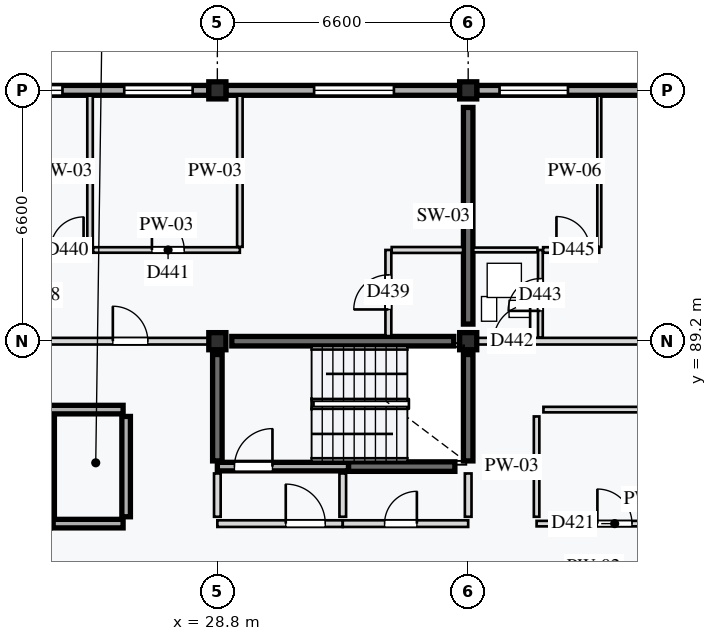
"""IFC4 building model, lengths in metres.
Left out: names, types, materials, properties, quantities, classifications, styles, units other than length and angle.
Written with IfcOpenShell. Run it as: python <this file> out.ifc"""

import sys

from ifc_helpers import new_model, si_unit, direction, frame, frame_2d, origin, origin_2d, place, context, subcontext, project, spatial, rectangle, extrude, element, fill, save


model = new_model("IFC4")
c1 = context("Model", 3, precision=1e-05, world=origin(), true_north=direction((0.0, 1.0)))
c2 = subcontext(c1, "Body", "Model", "MODEL_VIEW")
j1 = project(units=[si_unit("LENGTHUNIT", "METRE"), si_unit("PLANEANGLEUNIT", "RADIAN")], contexts=[c1])
p1 = place(None, origin())
s1 = spatial("IfcSite", under=j1, at=p1, CompositionType="ELEMENT")
p2 = place(p1, origin())
s2 = spatial("IfcBuilding", under=s1, at=p2, CompositionType="ELEMENT")
p3 = place(p2, frame((0.0, 0.0, 43.6)))
s3 = spatial("IfcBuildingStorey", under=s2, at=p3, CompositionType="ELEMENT", Elevation=43.6)
for number, where, z_axis, x_axis in (
    (1, (28.8, 89.2, 0.0), (0.0, 0.0, 1.0), (1.0, 0.0, 0.0)),
    (2, (28.8, 95.8, 0.0), (0.0, 0.0, 1.0), (1.0, 0.0, 0.0)),
    (3, (35.4, 89.2, 0.0), (0.0, 0.0, 1.0), (1.0, 0.0, 0.0)),
    (4, (35.4, 95.8, 0.0), (0.0, 0.0, 1.0), (1.0, 0.0, 0.0)),
):
    element("IfcColumn", number, at=place(p3, frame(where, z_axis=z_axis, x_axis=x_axis)), inside=s3, PredefinedType="COLUMN", context=c2, shape_type="SweptSolid", body=[
        extrude(rectangle(XDim=0.45, YDim=0.45, at=origin_2d()), origin(), (0.0, 0.0, 1.0), 3.2),
    ])
p4 = place(p3, frame((29.18, 89.2, 0.0), z_axis=(0.0, 0.0, 1.0), x_axis=(1.0, 0.0, 0.0)))
e5 = element("IfcWall", 5, at=p4, inside=s3, PredefinedType="SHEAR", context=c2, shape_type="SweptSolid", body=[
    extrude(rectangle(XDim=5.84, YDim=0.25, at=frame_2d((2.92, 0.0))), origin(), (0.0, 0.0, 1.0), 2.98),
])
for number, where, z_axis, x_axis in (
    (6, (32.25, 85.9, 0.0), (0.0, 0.0, 1.0), (1.0, 0.0, 0.0)),
    (7, (28.8, 86.05, 0.0), (0.0, 0.0, 1.0), (0.0, 1.0, 0.0)),
    (8, (35.4, 86.05, 0.0), (0.0, 0.0, 1.0), (0.0, 1.0, 0.0)),
):
    element("IfcWall", number, at=place(p3, frame(where, z_axis=z_axis, x_axis=x_axis)), inside=s3, PredefinedType="SHEAR", context=c2, shape_type="SweptSolid", body=[
        extrude(rectangle(XDim=2.8, YDim=0.25, at=frame_2d((1.4, 0.0))), origin(), (0.0, 0.0, 1.0), 2.98),
    ])
p5 = place(p3, frame((35.4, 89.65, 0.0), z_axis=(0.0, 0.0, 1.0), x_axis=(0.0, 1.0, 0.0)))
e9 = element("IfcWall", 9, at=p5, inside=s3, PredefinedType="SHEAR", context=c2, shape_type="SweptSolid", body=[
    extrude(rectangle(XDim=5.7, YDim=0.25, at=frame_2d((2.85, 0.0))), origin(), (0.0, 0.0, 1.0), 2.98),
])
p6 = place(p3, frame((22.425, 95.8, 0.0), z_axis=(0.0, 0.0, 1.0), x_axis=(1.0, 0.0, 0.0)))
e10 = element("IfcWall", 10, at=p6, inside=s3, PredefinedType="STANDARD", context=c2, shape_type="SweptSolid", body=[
    extrude(rectangle(XDim=6.15, YDim=0.26, at=frame_2d((3.075, 0.0))), origin(), (0.0, 0.0, 1.0), 2.6),
])
p7 = place(p6, frame((0.5, 0.0, 0.85)))
e11 = element("IfcOpeningElement", 11, at=p7, cuts=e10, PredefinedType="OPENING", context=c2, shape_type="SweptSolid", body=[
    extrude(rectangle(XDim=1.8, YDim=1.35, at=frame_2d((0.9, 0.675))), frame((0.0, 0.14, 0.0), z_axis=(0.0, -1.0, 0.0), x_axis=(1.0, 0.0, 0.0)), (0.0, 0.0, 1.0), 0.28),
])
p8 = place(p6, frame((3.925, 0.0, 0.85)))
e12 = element("IfcOpeningElement", 12, at=p8, cuts=e10, PredefinedType="OPENING", context=c2, shape_type="SweptSolid", body=[
    extrude(rectangle(XDim=1.8, YDim=1.35, at=frame_2d((0.9, 0.675))), frame((0.0, 0.14, 0.0), z_axis=(0.0, -1.0, 0.0), x_axis=(1.0, 0.0, 0.0)), (0.0, 0.0, 1.0), 0.28),
])
p9 = place(p3, frame((29.025, 95.8, 0.0), z_axis=(0.0, 0.0, 1.0), x_axis=(1.0, 0.0, 0.0)))
e13 = element("IfcWall", 13, at=p9, inside=s3, PredefinedType="STANDARD", context=c2, shape_type="SweptSolid", body=[
    extrude(rectangle(XDim=6.15, YDim=0.26, at=frame_2d((3.075, 0.0))), origin(), (0.0, 0.0, 1.0), 2.6),
])
p10 = place(p9, frame((2.321, 0.0, 0.85)))
e14 = element("IfcOpeningElement", 14, at=p10, cuts=e13, PredefinedType="OPENING", context=c2, shape_type="SweptSolid", body=[
    extrude(rectangle(XDim=2.1, YDim=1.55, at=frame_2d((1.05, 0.775))), frame((0.0, 0.14, 0.0), z_axis=(0.0, -1.0, 0.0), x_axis=(1.0, 0.0, 0.0)), (0.0, 0.0, 1.0), 0.28),
])
p11 = place(p3, frame((35.625, 95.8, 0.0), z_axis=(0.0, 0.0, 1.0), x_axis=(1.0, 0.0, 0.0)))
e15 = element("IfcWall", 15, at=p11, inside=s3, PredefinedType="STANDARD", context=c2, shape_type="SweptSolid", body=[
    extrude(rectangle(XDim=6.15, YDim=0.26, at=frame_2d((3.075, 0.0))), origin(), (0.0, 0.0, 1.0), 2.6),
])
p12 = place(p11, frame((0.6, 0.0, 0.85)))
e16 = element("IfcOpeningElement", 16, at=p12, cuts=e15, PredefinedType="OPENING", context=c2, shape_type="SweptSolid", body=[
    extrude(rectangle(XDim=1.8, YDim=1.35, at=frame_2d((0.9, 0.675))), frame((0.0, 0.14, 0.0), z_axis=(0.0, -1.0, 0.0), x_axis=(1.0, 0.0, 0.0)), (0.0, 0.0, 1.0), 0.28),
])
p13 = place(p3, frame((24.48, 84.4, 0.0), z_axis=(0.0, 0.0, 1.0), x_axis=(1.0, 0.0, 0.0)))
e17 = element("IfcWall", 17, at=p13, inside=s3, PredefinedType="STANDARD", context=c2, shape_type="SweptSolid", body=[
    extrude(rectangle(XDim=1.84, YDim=0.225, at=frame_2d((0.92, 0.0))), origin(), (0.0, 0.0, 1.0), 2.98),
])
p14 = place(p3, frame((22.298, 87.4, 0.0), z_axis=(0.0, 0.0, 1.0), x_axis=(1.0, 0.0, 0.0)))
e18 = element("IfcWall", 18, at=p14, inside=s3, PredefinedType="STANDARD", context=c2, shape_type="SweptSolid", body=[
    extrude(rectangle(XDim=4.022, YDim=0.225, at=frame_2d((2.011, 0.0))), origin(), (0.0, 0.0, 1.0), 2.98),
])
for number, where, z_axis, x_axis in (
    (19, (24.4, 84.58, 0.0), (0.0, 0.0, 1.0), (0.0, 1.0, 0.0)),
    (20, (26.4, 84.58, 0.0), (0.0, 0.0, 1.0), (0.0, 1.0, 0.0)),
):
    element("IfcWall", number, at=place(p3, frame(where, z_axis=z_axis, x_axis=x_axis)), inside=s3, PredefinedType="STANDARD", context=c2, shape_type="SweptSolid", body=[
        extrude(rectangle(XDim=2.64, YDim=0.225, at=frame_2d((1.32, 0.0))), origin(), (0.0, 0.0, 1.0), 2.98),
    ])
p15 = place(p3, frame((28.8, 85.9, 0.0), z_axis=(0.0, 0.0, 1.0), x_axis=(1.0, 0.0, 0.0)))
e21 = element("IfcWall", 21, at=p15, inside=s3, PredefinedType="STANDARD", context=c2, shape_type="SweptSolid", body=[
    extrude(rectangle(XDim=3.45, YDim=0.225, at=frame_2d((1.725, 0.0))), origin(), (0.0, 0.0, 1.0), 2.98),
])
p16 = place(p15, frame((0.45, 0.0, 0.0)))
e22 = element("IfcOpeningElement", 22, at=p16, cuts=e21, PredefinedType="OPENING", context=c2, shape_type="SweptSolid", body=[
    extrude(rectangle(XDim=1.0, YDim=2.16, at=frame_2d((0.5, 1.08))), frame((0.0, 0.123, 0.0), z_axis=(0.0, -1.0, 0.0), x_axis=(1.0, 0.0, 0.0)), (0.0, 0.0, 1.0), 0.245),
])
p17 = place(p3, frame((28.8, 84.4, 0.0), z_axis=(0.0, 0.0, 1.0), x_axis=(1.0, 0.0, 0.0)))
e23 = element("IfcWall", 23, at=p17, inside=s3, PredefinedType="PARTITIONING", context=c2, shape_type="SweptSolid", body=[
    extrude(rectangle(XDim=3.3, YDim=0.175, at=frame_2d((1.65, 0.0))), origin(), (0.0, 0.0, 1.0), 2.98),
])
p18 = place(p17, frame((1.8, 0.0, 0.0)))
e24 = element("IfcOpeningElement", 24, at=p18, cuts=e23, PredefinedType="OPENING", context=c2, shape_type="SweptSolid", body=[
    extrude(rectangle(XDim=1.04, YDim=2.12, at=frame_2d((0.52, 1.06))), frame((0.0, 0.097, 0.0), z_axis=(0.0, -1.0, 0.0), x_axis=(1.0, 0.0, 0.0)), (0.0, 0.0, 1.0), 0.195),
])
p19 = place(p3, frame((32.1, 84.4, 0.0), z_axis=(0.0, 0.0, 1.0), x_axis=(1.0, 0.0, 0.0)))
e25 = element("IfcWall", 25, at=p19, inside=s3, PredefinedType="PARTITIONING", context=c2, shape_type="SweptSolid", body=[
    extrude(rectangle(XDim=3.3, YDim=0.175, at=frame_2d((1.65, 0.0))), origin(), (0.0, 0.0, 1.0), 2.98),
])
p20 = place(p19, frame((1.1, 0.0, 0.0)))
e26 = element("IfcOpeningElement", 26, at=p20, cuts=e25, PredefinedType="OPENING", context=c2, shape_type="SweptSolid", body=[
    extrude(rectangle(XDim=0.85, YDim=2.0, at=frame_2d((0.425, 1.0))), frame((0.0, 0.097, 0.0), z_axis=(0.0, -1.0, 0.0), x_axis=(1.0, 0.0, 0.0)), (0.0, 0.0, 1.0), 0.195),
])
for number, where, z_axis, x_axis in (
    (27, (28.8, 84.58, 0.0), (0.0, 0.0, 1.0), (0.0, 1.0, 0.0)),
    (28, (32.1, 84.58, 0.0), (0.0, 0.0, 1.0), (0.0, 1.0, 0.0)),
    (29, (35.4, 84.58, 0.0), (0.0, 0.0, 1.0), (0.0, 1.0, 0.0)),
):
    element("IfcWall", number, at=place(p3, frame(where, z_axis=z_axis, x_axis=x_axis)), inside=s3, PredefinedType="PARTITIONING", context=c2, shape_type="SweptSolid", body=[
        extrude(rectangle(XDim=1.14, YDim=0.175, at=frame_2d((0.57, 0.0))), origin(), (0.0, 0.0, 1.0), 2.98),
    ])
p21 = place(p3, frame((37.2, 84.4, 0.0), z_axis=(0.0, 0.0, 1.0), x_axis=(1.0, 0.0, 0.0)))
e30 = element("IfcWall", 30, at=p21, inside=s3, PredefinedType="PARTITIONING", context=c2, shape_type="SweptSolid", body=[
    extrude(rectangle(XDim=6.0, YDim=0.145, at=frame_2d((3.0, 0.0))), origin(), (0.0, 0.0, 1.0), 2.98),
])
p22 = place(p21, frame((1.6, 0.0, 0.0)))
e31 = element("IfcOpeningElement", 31, at=p22, cuts=e30, PredefinedType="OPENING", context=c2, shape_type="SweptSolid", body=[
    extrude(rectangle(XDim=0.91, YDim=2.14, at=frame_2d((0.455, 1.07))), frame((0.0, 0.083, 0.0), z_axis=(0.0, -1.0, 0.0), x_axis=(1.0, 0.0, 0.0)), (0.0, 0.0, 1.0), 0.165),
])
p23 = place(p3, frame((37.38, 87.4, 0.0), z_axis=(0.0, 0.0, 1.0), x_axis=(1.0, 0.0, 0.0)))
e32 = element("IfcWall", 32, at=p23, inside=s3, PredefinedType="PARTITIONING", context=c2, shape_type="SweptSolid", body=[
    extrude(rectangle(XDim=11.2, YDim=0.145, at=frame_2d((5.6, 0.0))), origin(), (0.0, 0.0, 1.0), 2.98),
])
p24 = place(p3, frame((37.2, 84.58, 0.0), z_axis=(0.0, 0.0, 1.0), x_axis=(0.0, 1.0, 0.0)))
e33 = element("IfcWall", 33, at=p24, inside=s3, PredefinedType="PARTITIONING", context=c2, shape_type="SweptSolid", body=[
    extrude(rectangle(XDim=2.64, YDim=0.145, at=frame_2d((1.32, 0.0))), origin(), (0.0, 0.0, 1.0), 2.98),
])
p25 = place(p3, frame((22.2, 89.2, 0.0), z_axis=(0.0, 0.0, 1.0), x_axis=(1.0, 0.0, 0.0)))
e34 = element("IfcWall", 34, at=p25, inside=s3, PredefinedType="PARTITIONING", context=c2, shape_type="SweptSolid", body=[
    extrude(rectangle(XDim=6.6, YDim=0.175, at=frame_2d((3.3, 0.0))), origin(), (0.0, 0.0, 1.0), 2.7),
])
p26 = place(p25, frame((3.85, 0.0, 0.0)))
e35 = element("IfcOpeningElement", 35, at=p26, cuts=e34, PredefinedType="OPENING", context=c2, shape_type="SweptSolid", body=[
    extrude(rectangle(XDim=0.92, YDim=2.14, at=frame_2d((0.46, 1.07))), frame((0.0, 0.097, 0.0), z_axis=(0.0, -1.0, 0.0), x_axis=(1.0, 0.0, 0.0)), (0.0, 0.0, 1.0), 0.195),
])
p27 = place(p3, frame((33.3, 89.335, 0.0), z_axis=(0.0, 0.0, 1.0), x_axis=(0.0, 1.0, 0.0)))
e36 = element("IfcWall", 36, at=p27, inside=s3, PredefinedType="PARTITIONING", context=c2, shape_type="SweptSolid", body=[
    extrude(rectangle(XDim=2.265, YDim=0.155, at=frame_2d((1.133, 0.0))), origin(), (0.0, 0.0, 1.0), 2.98),
])
p28 = place(p27, frame((0.7, 0.0, 0.0)))
e37 = element("IfcOpeningElement", 37, at=p28, cuts=e36, PredefinedType="OPENING", context=c2, shape_type="SweptSolid", body=[
    extrude(rectangle(XDim=0.91, YDim=2.14, at=frame_2d((0.455, 1.07))), frame((0.0, 0.087, 0.0), z_axis=(0.0, -1.0, 0.0), x_axis=(1.0, 0.0, 0.0)), (0.0, 0.0, 1.0), 0.175),
])
p29 = place(p3, frame((33.387, 91.6, 0.0), z_axis=(0.0, 0.0, 1.0), x_axis=(1.0, 0.0, 0.0)))
e38 = element("IfcWall", 38, at=p29, inside=s3, PredefinedType="PARTITIONING", context=c2, shape_type="SweptSolid", body=[
    extrude(rectangle(XDim=1.877, YDim=0.155, at=frame_2d((0.939, 0.0))), origin(), (0.0, 0.0, 1.0), 2.98),
])
p30 = place(p3, frame((24.173, 91.6, 0.0), z_axis=(0.0, 0.0, 1.0), x_axis=(1.0, 0.0, 0.0)))
e39 = element("IfcWall", 39, at=p30, inside=s3, PredefinedType="PARTITIONING", context=c2, shape_type="SweptSolid", body=[
    extrude(rectangle(XDim=1.277, YDim=0.105, at=frame_2d((0.639, 0.0))), origin(), (0.0, 0.0, 1.0), 2.98),
])
p31 = place(p30, frame((0.238, 0.0, 0.0)))
e40 = element("IfcOpeningElement", 40, at=p31, cuts=e39, PredefinedType="OPENING", context=c2, shape_type="SweptSolid", body=[
    extrude(rectangle(XDim=0.87, YDim=2.08, at=frame_2d((0.435, 1.04))), frame((0.0, 0.062, 0.0), z_axis=(0.0, -1.0, 0.0), x_axis=(1.0, 0.0, 0.0)), (0.0, 0.0, 1.0), 0.125),
])
p32 = place(p3, frame((25.45, 91.68, 0.0), z_axis=(0.0, 0.0, 1.0), x_axis=(0.0, 1.0, 0.0)))
e41 = element("IfcWall", 41, at=p32, inside=s3, PredefinedType="PARTITIONING", context=c2, shape_type="SweptSolid", body=[
    extrude(rectangle(XDim=3.98, YDim=0.145, at=frame_2d((1.99, 0.0))), origin(), (0.0, 0.0, 1.0), 2.98),
])
p33 = place(p3, frame((25.532, 91.6, 0.0), z_axis=(0.0, 0.0, 1.0), x_axis=(1.0, 0.0, 0.0)))
e42 = element("IfcWall", 42, at=p33, inside=s3, PredefinedType="PARTITIONING", context=c2, shape_type="SweptSolid", body=[
    extrude(rectangle(XDim=3.86, YDim=0.145, at=frame_2d((1.93, 0.0))), origin(), (0.0, 0.0, 1.0), 2.98),
])
p34 = place(p33, frame((1.546, 0.0, 0.0)))
e43 = element("IfcOpeningElement", 43, at=p34, cuts=e42, PredefinedType="OPENING", context=c2, shape_type="SweptSolid", body=[
    extrude(rectangle(XDim=0.85, YDim=2.1, at=frame_2d((0.425, 1.05))), frame((0.0, 0.083, 0.0), z_axis=(0.0, -1.0, 0.0), x_axis=(1.0, 0.0, 0.0)), (0.0, 0.0, 1.0), 0.165),
])
p35 = place(p3, frame((29.392, 91.683, 0.0), z_axis=(0.0, 0.0, 1.0), x_axis=(0.0, 1.0, 0.0)))
e44 = element("IfcWall", 44, at=p35, inside=s3, PredefinedType="PARTITIONING", context=c2, shape_type="SweptSolid", body=[
    extrude(rectangle(XDim=3.977, YDim=0.145, at=frame_2d((1.989, 0.0))), origin(), (0.0, 0.0, 1.0), 2.98),
])
p36 = place(p3, frame((35.4, 89.2, 0.0), z_axis=(0.0, 0.0, 1.0), x_axis=(1.0, 0.0, 0.0)))
e45 = element("IfcWall", 45, at=p36, inside=s3, PredefinedType="PARTITIONING", context=c2, shape_type="SweptSolid", body=[
    extrude(rectangle(XDim=13.2, YDim=0.175, at=frame_2d((6.6, 0.0))), origin(), (0.0, 0.0, 1.0), 2.7),
])
p37 = place(p36, frame((0.67, 0.0, 0.0)))
e46 = element("IfcOpeningElement", 46, at=p37, cuts=e45, PredefinedType="OPENING", context=c2, shape_type="SweptSolid", body=[
    extrude(rectangle(XDim=0.96, YDim=2.18, at=frame_2d((0.48, 1.09))), frame((0.0, 0.097, 0.0), z_axis=(0.0, -1.0, 0.0), x_axis=(1.0, 0.0, 0.0)), (0.0, 0.0, 1.0), 0.195),
])
p38 = place(p3, frame((37.3, 89.298, 0.0), z_axis=(0.0, 0.0, 1.0), x_axis=(0.0, 1.0, 0.0)))
e47 = element("IfcWall", 47, at=p38, inside=s3, PredefinedType="PARTITIONING", context=c2, shape_type="SweptSolid", body=[
    extrude(rectangle(XDim=2.302, YDim=0.125, at=frame_2d((1.151, 0.0))), origin(), (0.0, 0.0, 1.0), 2.98),
])
p39 = place(p38, frame((0.7, 0.0, 0.0)))
e48 = element("IfcOpeningElement", 48, at=p39, cuts=e47, PredefinedType="OPENING", context=c2, shape_type="SweptSolid", body=[
    extrude(rectangle(XDim=0.85, YDim=2.04, at=frame_2d((0.425, 1.02))), frame((0.0, 0.073, 0.0), z_axis=(0.0, -1.0, 0.0), x_axis=(1.0, 0.0, 0.0)), (0.0, 0.0, 1.0), 0.145),
])
p40 = place(p3, frame((35.535, 91.6, 0.0), z_axis=(0.0, 0.0, 1.0), x_axis=(1.0, 0.0, 0.0)))
e49 = element("IfcWall", 49, at=p40, inside=s3, PredefinedType="PARTITIONING", context=c2, shape_type="SweptSolid", body=[
    extrude(rectangle(XDim=1.685, YDim=0.125, at=frame_2d((0.843, 0.0))), origin(), (0.0, 0.0, 1.0), 2.98),
])
p41 = place(p3, frame((37.373, 91.6, 0.0), z_axis=(0.0, 0.0, 1.0), x_axis=(1.0, 0.0, 0.0)))
e50 = element("IfcWall", 50, at=p41, inside=s3, PredefinedType="PARTITIONING", context=c2, shape_type="SweptSolid", body=[
    extrude(rectangle(XDim=1.478, YDim=0.145, at=frame_2d((0.739, 0.0))), origin(), (0.0, 0.0, 1.0), 2.98),
])
p42 = place(p41, frame((0.35, 0.0, 0.0)))
e51 = element("IfcOpeningElement", 51, at=p42, cuts=e50, PredefinedType="OPENING", context=c2, shape_type="SweptSolid", body=[
    extrude(rectangle(XDim=0.88, YDim=2.1, at=frame_2d((0.44, 1.05))), frame((0.0, 0.083, 0.0), z_axis=(0.0, -1.0, 0.0), x_axis=(1.0, 0.0, 0.0)), (0.0, 0.0, 1.0), 0.165),
])
p43 = place(p3, frame((38.85, 91.683, 0.0), z_axis=(0.0, 0.0, 1.0), x_axis=(0.0, 1.0, 0.0)))
e52 = element("IfcWall", 52, at=p43, inside=s3, PredefinedType="PARTITIONING", context=c2, shape_type="SweptSolid", body=[
    extrude(rectangle(XDim=3.977, YDim=0.105, at=frame_2d((1.989, 0.0))), origin(), (0.0, 0.0, 1.0), 2.98),
])
p44 = place(p7, origin())
e53 = element("IfcWindow", 53, at=p44, inside=s3, PartitioningType="SINGLE_PANEL", PredefinedType="WINDOW", context=c2, shape_type="SweptSolid", body=[
    extrude(rectangle(XDim=1.8, YDim=1.35, at=frame_2d((0.9, 0.675))), frame((0.0, 0.03, 0.0), z_axis=(0.0, -1.0, 0.0), x_axis=(1.0, 0.0, 0.0)), (0.0, 0.0, 1.0), 0.06),
])
fill(e11, e53)
p45 = place(p8, origin())
e54 = element("IfcWindow", 54, at=p45, inside=s3, PartitioningType="SINGLE_PANEL", PredefinedType="WINDOW", context=c2, shape_type="SweptSolid", body=[
    extrude(rectangle(XDim=1.8, YDim=1.35, at=frame_2d((0.9, 0.675))), frame((0.0, 0.03, 0.0), z_axis=(0.0, -1.0, 0.0), x_axis=(1.0, 0.0, 0.0)), (0.0, 0.0, 1.0), 0.06),
])
fill(e12, e54)
p46 = place(p10, origin())
e55 = element("IfcWindow", 55, at=p46, inside=s3, PartitioningType="SINGLE_PANEL", PredefinedType="WINDOW", context=c2, shape_type="SweptSolid", body=[
    extrude(rectangle(XDim=2.1, YDim=1.55, at=frame_2d((1.05, 0.775))), frame((0.0, 0.03, 0.0), z_axis=(0.0, -1.0, 0.0), x_axis=(1.0, 0.0, 0.0)), (0.0, 0.0, 1.0), 0.06),
])
fill(e14, e55)
p47 = place(p12, origin())
e56 = element("IfcWindow", 56, at=p47, inside=s3, PartitioningType="SINGLE_PANEL", PredefinedType="WINDOW", context=c2, shape_type="SweptSolid", body=[
    extrude(rectangle(XDim=1.8, YDim=1.35, at=frame_2d((0.9, 0.675))), frame((0.0, 0.03, 0.0), z_axis=(0.0, -1.0, 0.0), x_axis=(1.0, 0.0, 0.0)), (0.0, 0.0, 1.0), 0.06),
])
fill(e16, e56)
p48 = place(p16, origin())
e57 = element("IfcDoor", 57, at=p48, inside=s3, OperationType="SINGLE_SWING_RIGHT", PredefinedType="DOOR", context=c2, shape_type="SweptSolid", body=[
    extrude(rectangle(XDim=1.0, YDim=2.16, at=frame_2d((0.5, 1.08))), frame((0.0, 0.025, 0.0), z_axis=(0.0, -1.0, 0.0), x_axis=(1.0, 0.0, 0.0)), (0.0, 0.0, 1.0), 0.05),
])
fill(e22, e57)
p49 = place(p18, origin())
e58 = element("IfcDoor", 58, at=p49, inside=s3, OperationType="SINGLE_SWING_LEFT", PredefinedType="DOOR", context=c2, shape_type="SweptSolid", body=[
    extrude(rectangle(XDim=1.04, YDim=2.12, at=frame_2d((0.52, 1.06))), frame((0.0, 0.025, 0.0), z_axis=(0.0, -1.0, 0.0), x_axis=(1.0, 0.0, 0.0)), (0.0, 0.0, 1.0), 0.05),
])
fill(e24, e58)
p50 = place(p20, origin())
e59 = element("IfcDoor", 59, at=p50, inside=s3, OperationType="SINGLE_SWING_RIGHT", PredefinedType="DOOR", context=c2, shape_type="SweptSolid", body=[
    extrude(rectangle(XDim=0.85, YDim=2.0, at=frame_2d((0.425, 1.0))), frame((0.0, 0.025, 0.0), z_axis=(0.0, -1.0, 0.0), x_axis=(1.0, 0.0, 0.0)), (0.0, 0.0, 1.0), 0.05),
])
fill(e26, e59)
p51 = place(p22, origin())
e60 = element("IfcDoor", 60, at=p51, inside=s3, OperationType="SINGLE_SWING_LEFT", PredefinedType="DOOR", context=c2, shape_type="SweptSolid", body=[
    extrude(rectangle(XDim=0.91, YDim=2.14, at=frame_2d((0.455, 1.07))), frame((0.0, 0.025, 0.0), z_axis=(0.0, -1.0, 0.0), x_axis=(1.0, 0.0, 0.0)), (0.0, 0.0, 1.0), 0.05),
])
fill(e31, e60)
p52 = place(p26, origin())
e61 = element("IfcDoor", 61, at=p52, inside=s3, OperationType="SINGLE_SWING_LEFT", PredefinedType="DOOR", context=c2, shape_type="SweptSolid", body=[
    extrude(rectangle(XDim=0.92, YDim=2.14, at=frame_2d((0.46, 1.07))), frame((0.0, 0.025, 0.0), z_axis=(0.0, -1.0, 0.0), x_axis=(1.0, 0.0, 0.0)), (0.0, 0.0, 1.0), 0.05),
])
fill(e35, e61)
p53 = place(p28, origin())
e62 = element("IfcDoor", 62, at=p53, inside=s3, OperationType="SINGLE_SWING_LEFT", PredefinedType="DOOR", context=c2, shape_type="SweptSolid", body=[
    extrude(rectangle(XDim=0.91, YDim=2.14, at=frame_2d((0.455, 1.07))), frame((0.0, 0.025, 0.0), z_axis=(0.0, -1.0, 0.0), x_axis=(1.0, 0.0, 0.0)), (0.0, 0.0, 1.0), 0.05),
])
fill(e37, e62)
p54 = place(p31, origin())
e63 = element("IfcDoor", 63, at=p54, inside=s3, OperationType="SINGLE_SWING_RIGHT", PredefinedType="DOOR", context=c2, shape_type="SweptSolid", body=[
    extrude(rectangle(XDim=0.87, YDim=2.08, at=frame_2d((0.435, 1.04))), frame((0.0, 0.025, 0.0), z_axis=(0.0, -1.0, 0.0), x_axis=(1.0, 0.0, 0.0)), (0.0, 0.0, 1.0), 0.05),
])
fill(e40, e63)
p55 = place(p34, origin())
e64 = element("IfcDoor", 64, at=p55, inside=s3, OperationType="SINGLE_SWING_LEFT", PredefinedType="DOOR", context=c2, shape_type="SweptSolid", body=[
    extrude(rectangle(XDim=0.85, YDim=2.1, at=frame_2d((0.425, 1.05))), frame((0.0, 0.025, 0.0), z_axis=(0.0, -1.0, 0.0), x_axis=(1.0, 0.0, 0.0)), (0.0, 0.0, 1.0), 0.05),
])
fill(e43, e64)
p56 = place(p37, origin())
e65 = element("IfcDoor", 65, at=p56, inside=s3, OperationType="SINGLE_SWING_RIGHT", PredefinedType="DOOR", context=c2, shape_type="SweptSolid", body=[
    extrude(rectangle(XDim=0.96, YDim=2.18, at=frame_2d((0.48, 1.09))), frame((0.0, 0.025, 0.0), z_axis=(0.0, -1.0, 0.0), x_axis=(1.0, 0.0, 0.0)), (0.0, 0.0, 1.0), 0.05),
])
fill(e46, e65)
p57 = place(p39, origin())
e66 = element("IfcDoor", 66, at=p57, inside=s3, OperationType="SINGLE_SWING_LEFT", PredefinedType="DOOR", context=c2, shape_type="SweptSolid", body=[
    extrude(rectangle(XDim=0.85, YDim=2.04, at=frame_2d((0.425, 1.02))), frame((0.0, 0.025, 0.0), z_axis=(0.0, -1.0, 0.0), x_axis=(1.0, 0.0, 0.0)), (0.0, 0.0, 1.0), 0.05),
])
fill(e48, e66)
p58 = place(p42, origin())
e67 = element("IfcDoor", 67, at=p58, inside=s3, OperationType="SINGLE_SWING_LEFT", PredefinedType="DOOR", context=c2, shape_type="SweptSolid", body=[
    extrude(rectangle(XDim=0.88, YDim=2.1, at=frame_2d((0.44, 1.05))), frame((0.0, 0.025, 0.0), z_axis=(0.0, -1.0, 0.0), x_axis=(1.0, 0.0, 0.0)), (0.0, 0.0, 1.0), 0.05),
])
fill(e51, e67)
save(model, sys.argv[1])
